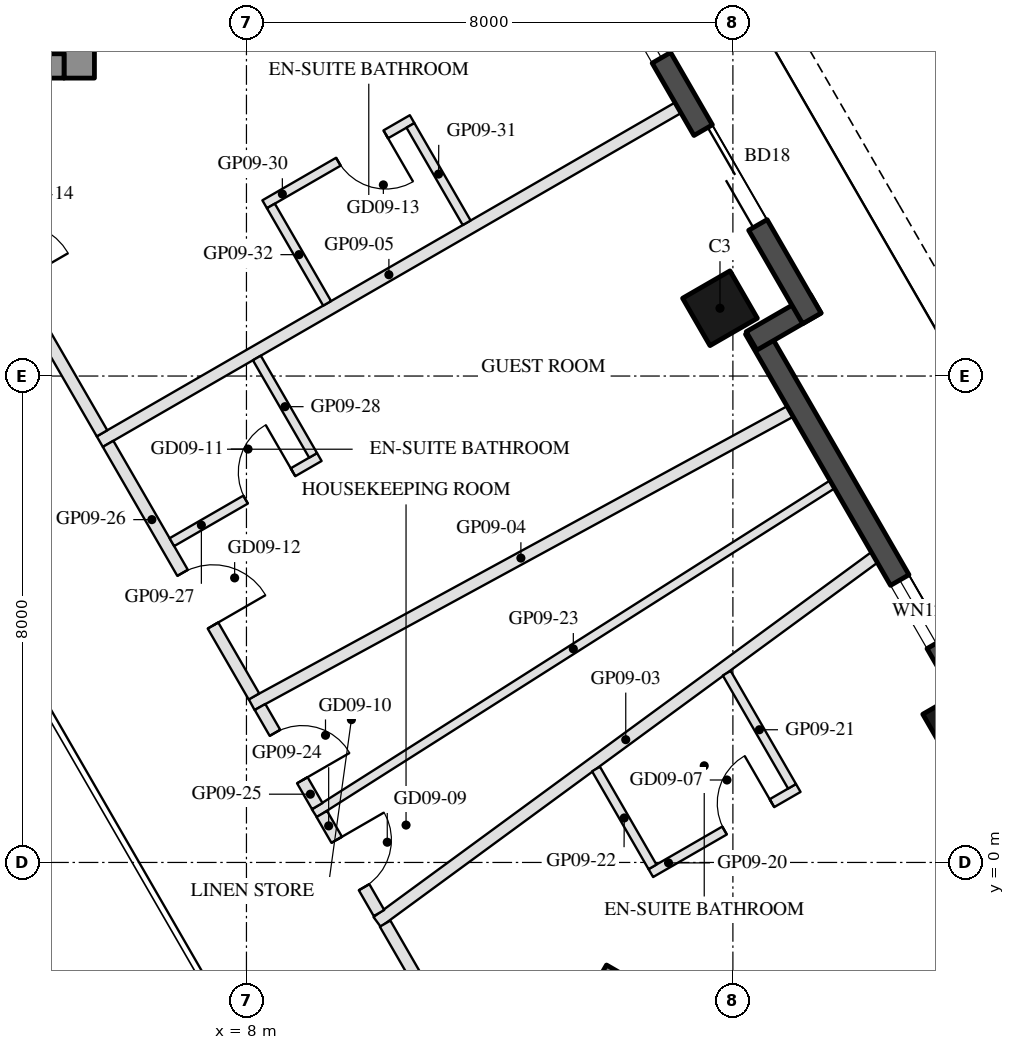
"""IFC4 building model, lengths in metres.
Left out: names, types, materials, properties, quantities, classifications, styles, units other than length and angle.
Written with IfcOpenShell. Run it as: python <this file> out.ifc"""

import sys

from ifc_helpers import new_model, si_unit, direction, frame, frame_2d, origin, origin_2d, place, context, subcontext, project, spatial, rectangle, hollow_rectangle, extrude, element, fill, save


model = new_model("IFC4")
c1 = context("Model", 3, precision=1e-05, world=origin(), true_north=direction((0.0, 1.0)))
c2 = subcontext(c1, "Body", "Model", "MODEL_VIEW")
j1 = project(units=[si_unit("LENGTHUNIT", "METRE"), si_unit("PLANEANGLEUNIT", "RADIAN")], contexts=[c1])
p1 = place(None, origin())
s1 = spatial("IfcSite", under=j1, at=p1, CompositionType="ELEMENT")
p2 = place(p1, origin())
s2 = spatial("IfcBuilding", under=s1, at=p2, CompositionType="ELEMENT")
p3 = place(p2, frame((0.0, 0.0, 113.1)))
s3 = spatial("IfcBuildingStorey", under=s2, at=p3, CompositionType="ELEMENT", Elevation=113.1)
for number, where, z_axis, x_axis in (
    (1, (19.738, 2.273, 0.0), (0.0, 0.0, 1.0), (-0.5, 0.866, 0.0)),
    (2, (15.788, 9.115, 0.0), (0.0, 0.0, 1.0), (-0.5, 0.866, 0.0)),
):
    element("IfcColumn", number, at=place(p3, frame(where, z_axis=z_axis, x_axis=x_axis)), inside=s3, PredefinedType="COLUMN", context=c2, shape_type="SweptSolid", body=[
        extrude(hollow_rectangle(XDim=0.9, YDim=0.9, WallThickness=0.04, at=origin_2d()), origin(), (0.0, 0.0, 1.0), 3.7),
    ])
p4 = place(p3, frame((19.729, 2.938, 0.0), z_axis=(0.0, 0.0, 1.0), x_axis=(-0.499976430342, 0.866039011305, 0.0)))
e3 = element("IfcWall", 3, at=p4, inside=s3, PredefinedType="SOLIDWALL", context=c2, shape_type="SweptSolid", body=[
    extrude(rectangle(XDim=6.74, YDim=0.35, at=frame_2d((3.37, 0.0))), origin(), (0.0, 0.0, 1.0), 3.55),
])
p5 = place(p4, frame((0.77, 0.0, 0.3)))
e4 = element("IfcOpeningElement", 4, at=p5, cuts=e3, PredefinedType="OPENING", context=c2, shape_type="SweptSolid", body=[
    extrude(rectangle(XDim=1.2, YDim=2.65, at=frame_2d((0.6, 1.325))), frame((0.0, 0.185, 0.0), z_axis=(0.0, -1.0, 0.0), x_axis=(1.0, 0.0, 0.0)), (0.0, 0.0, 1.0), 0.37),
])
p6 = place(p3, frame((16.306, 8.577, 0.0), z_axis=(0.0, 0.0, 1.0), x_axis=(0.866092288191, 0.499884134912, 0.0)))
e5 = element("IfcWall", 5, at=p6, inside=s3, PredefinedType="SOLIDWALL", context=c2, shape_type="SweptSolid", body=[
    extrude(rectangle(XDim=1.22, YDim=0.35, at=frame_2d((0.61, 0.0))), origin(), (0.0, 0.0, 1.0), 3.55),
])
p7 = place(p3, frame((17.299, 8.948, 0.0), z_axis=(0.0, 0.0, 1.0), x_axis=(-0.500010041276, 0.866019606374, 0.0)))
e6 = element("IfcWall", 6, at=p7, inside=s3, PredefinedType="SOLIDWALL", context=c2, shape_type="SweptSolid", body=[
    extrude(rectangle(XDim=9.7, YDim=0.35, at=frame_2d((4.85, 0.0))), origin(), (0.0, 0.0, 1.0), 3.55),
])
p8 = place(p7, frame((1.775, 0.0, 0.0)))
e7 = element("IfcOpeningElement", 7, at=p8, cuts=e6, PredefinedType="OPENING", context=c2, shape_type="SweptSolid", body=[
    extrude(rectangle(XDim=1.8, YDim=2.4, at=frame_2d((0.9, 1.2))), frame((0.0, 0.185, 0.0), z_axis=(0.0, -1.0, 0.0), x_axis=(1.0, 0.0, 0.0)), (0.0, 0.0, 1.0), 0.37),
])
p9 = place(p7, frame((4.949, 0.0, 0.3)))
e8 = element("IfcOpeningElement", 8, at=p9, cuts=e6, PredefinedType="OPENING", context=c2, shape_type="SweptSolid", body=[
    extrude(rectangle(XDim=3.0, YDim=2.65, at=frame_2d((1.5, 1.325))), frame((0.0, 0.185, 0.0), z_axis=(0.0, -1.0, 0.0), x_axis=(1.0, 0.0, 0.0)), (0.0, 0.0, 1.0), 0.37),
])
p10 = place(p3, frame((5.25, 12.9, 0.0), z_axis=(0.0, 0.0, 1.0), x_axis=(0.0, 1.0, 0.0)))
e9 = element("IfcWall", 9, at=p10, inside=s3, PredefinedType="SHEAR", context=c2, shape_type="SweptSolid", body=[
    extrude(rectangle(XDim=14.837, YDim=0.5, at=frame_2d((7.418, 0.0))), origin(), (0.0, 0.0, 1.0), 3.5),
])
p11 = place(p3, frame((5.0, 13.1, 0.0), z_axis=(0.0, 0.0, 1.0), x_axis=(-1.0, 0.0, 0.0)))
e10 = element("IfcWall", 10, at=p11, inside=s3, PredefinedType="SHEAR", context=c2, shape_type="SweptSolid", body=[
    extrude(rectangle(XDim=10.0, YDim=0.4, at=frame_2d((5.0, 0.0))), origin(), (0.0, 0.0, 1.0), 3.5),
])
p12 = place(p11, frame((3.55, 0.0, 0.0)))
e11 = element("IfcOpeningElement", 11, at=p12, cuts=e10, PredefinedType="OPENING", context=c2, shape_type="SweptSolid", body=[
    extrude(rectangle(XDim=1.1, YDim=2.1, at=frame_2d((0.55, 1.05))), frame((0.0, 0.21, 0.0), z_axis=(0.0, -1.0, 0.0), x_axis=(1.0, 0.0, 0.0)), (0.0, 0.0, 1.0), 0.42),
])
p13 = place(p11, frame((5.85, 0.0, 0.0)))
e12 = element("IfcOpeningElement", 12, at=p13, cuts=e10, PredefinedType="OPENING", context=c2, shape_type="SweptSolid", body=[
    extrude(rectangle(XDim=1.4, YDim=2.1, at=frame_2d((0.7, 1.05))), frame((0.0, 0.21, 0.0), z_axis=(0.0, -1.0, 0.0), x_axis=(1.0, 0.0, 0.0)), (0.0, 0.0, 1.0), 0.42),
])
p14 = place(p3, frame((13.797, -1.903, 0.0), z_axis=(0.0, 0.0, 1.0), x_axis=(0.866025009528, -0.500000682871, 0.0)))
e13 = element("IfcWall", 13, at=p14, inside=s3, PredefinedType="SHEAR", context=c2, shape_type="SweptSolid", body=[
    extrude(rectangle(XDim=14.837, YDim=0.5, at=frame_2d((7.418, 0.0))), origin(), (0.0, 0.0, 1.0), 3.5),
])
p15 = place(p3, frame((18.327, 5.017, 0.0), z_axis=(0.0, 0.0, 1.0), x_axis=(-0.806479235934, -0.59126241383, 0.0)))
e14 = element("IfcWall", 14, at=p15, inside=s3, PredefinedType="PARTITIONING", context=c2, shape_type="SweptSolid", body=[
    extrude(rectangle(XDim=10.14, YDim=0.2, at=frame_2d((5.07, 0.0))), origin(), (0.0, 0.0, 1.0), 2.96),
])
p16 = place(p3, frame((16.941, 7.417, 0.0), z_axis=(0.0, 0.0, 1.0), x_axis=(-0.878270052011, -0.478164946164, 0.0)))
e15 = element("IfcWall", 15, at=p16, inside=s3, PredefinedType="PARTITIONING", context=c2, shape_type="SweptSolid", body=[
    extrude(rectangle(XDim=10.083, YDim=0.2, at=frame_2d((5.042, 0.0))), origin(), (0.0, 0.0, 1.0), 2.96),
])
p17 = place(p3, frame((15.097, 12.411, 0.0), z_axis=(0.0, 0.0, 1.0), x_axis=(-0.866027479907, -0.499996404033, 0.0)))
e16 = element("IfcWall", 16, at=p17, inside=s3, PredefinedType="PARTITIONING", context=c2, shape_type="SweptSolid", body=[
    extrude(rectangle(XDim=10.98, YDim=0.2, at=frame_2d((5.49, 0.0))), origin(), (0.0, 0.0, 1.0), 2.96),
])
p18 = place(p3, frame((10.281, -1.006, 0.0), z_axis=(0.0, 0.0, 1.0), x_axis=(0.499995262016, -0.866028139243, 0.0)))
e17 = element("IfcWall", 17, at=p18, inside=s3, PredefinedType="PARTITIONING", context=c2, shape_type="SweptSolid", body=[
    extrude(rectangle(XDim=3.977, YDim=0.2, at=frame_2d((1.988, 0.0))), origin(), (0.0, 0.0, 1.0), 2.95),
])
p19 = place(p18, frame((1.488, 0.0, 0.0)))
e18 = element("IfcOpeningElement", 18, at=p19, cuts=e17, PredefinedType="OPENING", context=c2, shape_type="SweptSolid", body=[
    extrude(rectangle(XDim=1.0, YDim=2.1, at=frame_2d((0.5, 1.05))), frame((0.0, 0.11, 0.0), z_axis=(0.0, -1.0, 0.0), x_axis=(1.0, 0.0, 0.0)), (0.0, 0.0, 1.0), 0.22),
])
p20 = place(p3, frame((14.65, -0.175, 0.0), z_axis=(0.0, 0.0, 1.0), x_axis=(0.866034573852, 0.49998411664, 0.0)))
e19 = element("IfcWall", 19, at=p20, inside=s3, PredefinedType="PARTITIONING", context=c2, shape_type="SweptSolid", body=[
    extrude(rectangle(XDim=2.8, YDim=0.15, at=frame_2d((1.4, 0.0))), origin(), (0.0, 0.0, 1.0), 3.55),
])
p21 = place(p20, frame((1.4, 0.0, 0.0)))
e20 = element("IfcOpeningElement", 20, at=p21, cuts=e19, PredefinedType="OPENING", context=c2, shape_type="SweptSolid", body=[
    extrude(rectangle(XDim=0.9, YDim=2.1, at=frame_2d((0.45, 1.05))), frame((0.0, 0.085, 0.0), z_axis=(0.0, -1.0, 0.0), x_axis=(1.0, 0.0, 0.0)), (0.0, 0.0, 1.0), 0.17),
])
p22 = place(p3, frame((16.973, 1.252, 0.0), z_axis=(0.0, 0.0, 1.0), x_axis=(-0.499965131781, 0.866045534024, 0.0)))
e21 = element("IfcWall", 21, at=p22, inside=s3, PredefinedType="PARTITIONING", context=c2, shape_type="SweptSolid", body=[
    extrude(rectangle(XDim=2.148, YDim=0.15, at=frame_2d((1.074, 0.0))), origin(), (0.0, 0.0, 1.0), 3.55),
])
p23 = place(p3, frame((14.678, -0.073, 0.0), z_axis=(0.0, 0.0, 1.0), x_axis=(-0.499968895414, 0.866043361281, 0.0)))
e22 = element("IfcWall", 22, at=p23, inside=s3, PredefinedType="PARTITIONING", context=c2, shape_type="SweptSolid", body=[
    extrude(rectangle(XDim=1.858, YDim=0.15, at=frame_2d((0.929, 0.0))), origin(), (0.0, 0.0, 1.0), 3.55),
])
p24 = place(p3, frame((17.634, 6.217, 0.0), z_axis=(0.0, 0.0, 1.0), x_axis=(-0.844171272136, -0.536073561463, 0.0)))
e23 = element("IfcWall", 23, at=p24, inside=s3, PredefinedType="PARTITIONING", context=c2, shape_type="SweptSolid", body=[
    extrude(rectangle(XDim=10.089, YDim=0.15, at=frame_2d((5.044, 0.0))), origin(), (0.0, 0.0, 1.0), 2.95),
])
p25 = place(p3, frame((9.239, 0.797, 0.0), z_axis=(0.0, 0.0, 1.0), x_axis=(0.499992114976, -0.866029956157, 0.0)))
e24 = element("IfcWall", 24, at=p25, inside=s3, PredefinedType="PARTITIONING", context=c2, shape_type="SweptSolid", body=[
    extrude(rectangle(XDim=1.881, YDim=0.2, at=frame_2d((0.94, 0.0))), origin(), (0.0, 0.0, 1.0), 2.95),
])
p26 = place(p25, frame((0.49, 0.0, 0.0)))
e25 = element("IfcOpeningElement", 25, at=p26, cuts=e24, PredefinedType="OPENING", context=c2, shape_type="SweptSolid", body=[
    extrude(rectangle(XDim=0.9, YDim=2.1, at=frame_2d((0.45, 1.05))), frame((0.0, 0.11, 0.0), z_axis=(0.0, -1.0, 0.0), x_axis=(1.0, 0.0, 0.0)), (0.0, 0.0, 1.0), 0.22),
])
p27 = place(p3, frame((8.223, 2.557, 0.0), z_axis=(0.0, 0.0, 1.0), x_axis=(0.500018191375, -0.866014900734, 0.0)))
e26 = element("IfcWall", 26, at=p27, inside=s3, PredefinedType="PARTITIONING", context=c2, shape_type="SweptSolid", body=[
    extrude(rectangle(XDim=1.882, YDim=0.2, at=frame_2d((0.941, 0.0))), origin(), (0.0, 0.0, 1.0), 3.55),
])
p28 = place(p27, frame((0.491, 0.0, 0.0)))
e27 = element("IfcOpeningElement", 27, at=p28, cuts=e26, PredefinedType="OPENING", context=c2, shape_type="SweptSolid", body=[
    extrude(rectangle(XDim=0.9, YDim=2.1, at=frame_2d((0.45, 1.05))), frame((0.0, 0.11, 0.0), z_axis=(0.0, -1.0, 0.0), x_axis=(1.0, 0.0, 0.0)), (0.0, 0.0, 1.0), 0.22),
])
p29 = place(p3, frame((5.725, 6.885, 0.0), z_axis=(0.0, 0.0, 1.0), x_axis=(0.499986760557, -0.866033047446, 0.0)))
e28 = element("IfcWall", 28, at=p29, inside=s3, PredefinedType="PARTITIONING", context=c2, shape_type="SweptSolid", body=[
    extrude(rectangle(XDim=4.798, YDim=0.2, at=frame_2d((2.399, 0.0))), origin(), (0.0, 0.0, 1.0), 2.95),
])
p30 = place(p29, frame((2.45, 0.0, 0.0)))
e29 = element("IfcOpeningElement", 29, at=p30, cuts=e28, PredefinedType="OPENING", context=c2, shape_type="SweptSolid", body=[
    extrude(rectangle(XDim=1.0, YDim=2.1, at=frame_2d((0.5, 1.05))), frame((0.0, 0.11, 0.0), z_axis=(0.0, -1.0, 0.0), x_axis=(1.0, 0.0, 0.0)), (0.0, 0.0, 1.0), 0.22),
])
p31 = place(p3, frame((6.774, 5.268, 0.0), z_axis=(0.0, 0.0, 1.0), x_axis=(0.866034573852, 0.49998411664, 0.0)))
e30 = element("IfcWall", 30, at=p31, inside=s3, PredefinedType="PARTITIONING", context=c2, shape_type="SweptSolid", body=[
    extrude(rectangle(XDim=2.8, YDim=0.15, at=frame_2d((1.4, 0.0))), origin(), (0.0, 0.0, 1.0), 3.55),
])
p32 = place(p31, frame((1.4, 0.0, 0.0)))
e31 = element("IfcOpeningElement", 31, at=p32, cuts=e30, PredefinedType="OPENING", context=c2, shape_type="SweptSolid", body=[
    extrude(rectangle(XDim=0.9, YDim=2.1, at=frame_2d((0.45, 1.05))), frame((0.0, 0.085, 0.0), z_axis=(0.0, -1.0, 0.0), x_axis=(1.0, 0.0, 0.0)), (0.0, 0.0, 1.0), 0.17),
])
p33 = place(p3, frame((9.096, 6.695, 0.0), z_axis=(0.0, 0.0, 1.0), x_axis=(-0.500042316284, 0.866000971088, 0.0)))
e32 = element("IfcWall", 32, at=p33, inside=s3, PredefinedType="PARTITIONING", context=c2, shape_type="SweptSolid", body=[
    extrude(rectangle(XDim=1.85, YDim=0.15, at=frame_2d((0.925, 0.0))), origin(), (0.0, 0.0, 1.0), 3.55),
])
p34 = place(p3, frame((2.281, 12.85, 0.0), z_axis=(0.0, 0.0, 1.0), x_axis=(0.499982611572, -0.866035442765, 0.0)))
e33 = element("IfcWall", 33, at=p34, inside=s3, PredefinedType="PARTITIONING", context=c2, shape_type="SweptSolid", body=[
    extrude(rectangle(XDim=6.688, YDim=0.2, at=frame_2d((3.344, 0.0))), origin(), (0.0, 0.0, 1.0), 2.95),
])
p35 = place(p34, frame((2.844, 0.0, 0.0)))
e34 = element("IfcOpeningElement", 34, at=p35, cuts=e33, PredefinedType="OPENING", context=c2, shape_type="SweptSolid", body=[
    extrude(rectangle(XDim=1.0, YDim=2.1, at=frame_2d((0.5, 1.05))), frame((0.0, 0.11, 0.0), z_axis=(0.0, -1.0, 0.0), x_axis=(1.0, 0.0, 0.0)), (0.0, 0.0, 1.0), 0.22),
])
p36 = place(p3, frame((10.724, 12.225, 0.0), z_axis=(0.0, 0.0, 1.0), x_axis=(-0.866018616679, -0.500011755427, 0.0)))
e35 = element("IfcWall", 35, at=p36, inside=s3, PredefinedType="PARTITIONING", context=c2, shape_type="SweptSolid", body=[
    extrude(rectangle(XDim=2.8, YDim=0.15, at=frame_2d((1.4, 0.0))), origin(), (0.0, 0.0, 1.0), 3.55),
])
p37 = place(p36, frame((0.5, 0.0, 0.0)))
e36 = element("IfcOpeningElement", 36, at=p37, cuts=e35, PredefinedType="OPENING", context=c2, shape_type="SweptSolid", body=[
    extrude(rectangle(XDim=0.9, YDim=2.1, at=frame_2d((0.45, 1.05))), frame((0.0, 0.085, 0.0), z_axis=(0.0, -1.0, 0.0), x_axis=(1.0, 0.0, 0.0)), (0.0, 0.0, 1.0), 0.17),
])
p38 = place(p3, frame((11.622, 10.521, 0.0), z_axis=(0.0, 0.0, 1.0), x_axis=(-0.500042316284, 0.866000971088, 0.0)))
e37 = element("IfcWall", 37, at=p38, inside=s3, PredefinedType="PARTITIONING", context=c2, shape_type="SweptSolid", body=[
    extrude(rectangle(XDim=1.85, YDim=0.15, at=frame_2d((0.925, 0.0))), origin(), (0.0, 0.0, 1.0), 2.95),
])
p39 = place(p3, frame((9.327, 9.195, 0.0), z_axis=(0.0, 0.0, 1.0), x_axis=(-0.499985172903, 0.866033964044, 0.0)))
e38 = element("IfcWall", 38, at=p39, inside=s3, PredefinedType="PARTITIONING", context=c2, shape_type="SweptSolid", body=[
    extrude(rectangle(XDim=1.85, YDim=0.15, at=frame_2d((0.925, 0.0))), origin(), (0.0, 0.0, 1.0), 2.95),
])
p40 = place(p5, origin())
e39 = element("IfcWindow", 39, at=p40, inside=s3, PartitioningType="SINGLE_PANEL", PredefinedType="WINDOW", context=c2, shape_type="SweptSolid", body=[
    extrude(rectangle(XDim=1.2, YDim=2.65, at=frame_2d((0.6, 1.325))), frame((0.0, 0.03, 0.0), z_axis=(0.0, -1.0, 0.0), x_axis=(1.0, 0.0, 0.0)), (0.0, 0.0, 1.0), 0.06),
])
fill(e4, e39)
p41 = place(p8, frame((1.8, 0.0, 0.0), z_axis=(0.0, 0.0, 1.0), x_axis=(-1.0, 0.0, 0.0)))
e40 = element("IfcDoor", 40, at=p41, inside=s3, OperationType="SLIDING_TO_LEFT", PredefinedType="DOOR", context=c2, shape_type="SweptSolid", body=[
    extrude(rectangle(XDim=1.8, YDim=2.4, at=frame_2d((0.9, 1.2))), frame((0.0, 0.025, 0.0), z_axis=(0.0, -1.0, 0.0), x_axis=(1.0, 0.0, 0.0)), (0.0, 0.0, 1.0), 0.05),
])
fill(e7, e40)
p42 = place(p9, origin())
e41 = element("IfcWindow", 41, at=p42, inside=s3, PartitioningType="SINGLE_PANEL", PredefinedType="WINDOW", context=c2, shape_type="SweptSolid", body=[
    extrude(rectangle(XDim=3.0, YDim=2.65, at=frame_2d((1.5, 1.325))), frame((0.0, 0.03, 0.0), z_axis=(0.0, -1.0, 0.0), x_axis=(1.0, 0.0, 0.0)), (0.0, 0.0, 1.0), 0.06),
])
fill(e8, e41)
p43 = place(p21, origin())
e42 = element("IfcDoor", 42, at=p43, inside=s3, OperationType="SINGLE_SWING_RIGHT", PredefinedType="DOOR", context=c2, shape_type="SweptSolid", body=[
    extrude(rectangle(XDim=0.9, YDim=2.1, at=frame_2d((0.45, 1.05))), frame((0.0, 0.025, 0.0), z_axis=(0.0, -1.0, 0.0), x_axis=(1.0, 0.0, 0.0)), (0.0, 0.0, 1.0), 0.05),
])
fill(e20, e42)
p44 = place(p26, origin())
e43 = element("IfcDoor", 43, at=p44, inside=s3, OperationType="SINGLE_SWING_LEFT", PredefinedType="DOOR", context=c2, shape_type="SweptSolid", body=[
    extrude(rectangle(XDim=0.9, YDim=2.1, at=frame_2d((0.45, 1.05))), frame((0.0, 0.025, 0.0), z_axis=(0.0, -1.0, 0.0), x_axis=(1.0, 0.0, 0.0)), (0.0, 0.0, 1.0), 0.05),
])
fill(e25, e43)
p45 = place(p28, origin())
e44 = element("IfcDoor", 44, at=p45, inside=s3, OperationType="SINGLE_SWING_RIGHT", PredefinedType="DOOR", context=c2, shape_type="SweptSolid", body=[
    extrude(rectangle(XDim=0.9, YDim=2.1, at=frame_2d((0.45, 1.05))), frame((0.0, 0.025, 0.0), z_axis=(0.0, -1.0, 0.0), x_axis=(1.0, 0.0, 0.0)), (0.0, 0.0, 1.0), 0.05),
])
fill(e27, e44)
p46 = place(p32, origin())
e45 = element("IfcDoor", 45, at=p46, inside=s3, OperationType="SINGLE_SWING_RIGHT", PredefinedType="DOOR", context=c2, shape_type="SweptSolid", body=[
    extrude(rectangle(XDim=0.9, YDim=2.1, at=frame_2d((0.45, 1.05))), frame((0.0, 0.025, 0.0), z_axis=(0.0, -1.0, 0.0), x_axis=(1.0, 0.0, 0.0)), (0.0, 0.0, 1.0), 0.05),
])
fill(e31, e45)
p47 = place(p30, origin())
e46 = element("IfcDoor", 46, at=p47, inside=s3, OperationType="SINGLE_SWING_RIGHT", PredefinedType="DOOR", context=c2, shape_type="SweptSolid", body=[
    extrude(rectangle(XDim=1.0, YDim=2.1, at=frame_2d((0.5, 1.05))), frame((0.0, 0.025, 0.0), z_axis=(0.0, -1.0, 0.0), x_axis=(1.0, 0.0, 0.0)), (0.0, 0.0, 1.0), 0.05),
])
fill(e29, e46)
p48 = place(p37, origin())
e47 = element("IfcDoor", 47, at=p48, inside=s3, OperationType="SINGLE_SWING_LEFT", PredefinedType="DOOR", context=c2, shape_type="SweptSolid", body=[
    extrude(rectangle(XDim=0.9, YDim=2.1, at=frame_2d((0.45, 1.05))), frame((0.0, 0.025, 0.0), z_axis=(0.0, -1.0, 0.0), x_axis=(1.0, 0.0, 0.0)), (0.0, 0.0, 1.0), 0.05),
])
fill(e36, e47)
save(model, sys.argv[1])
